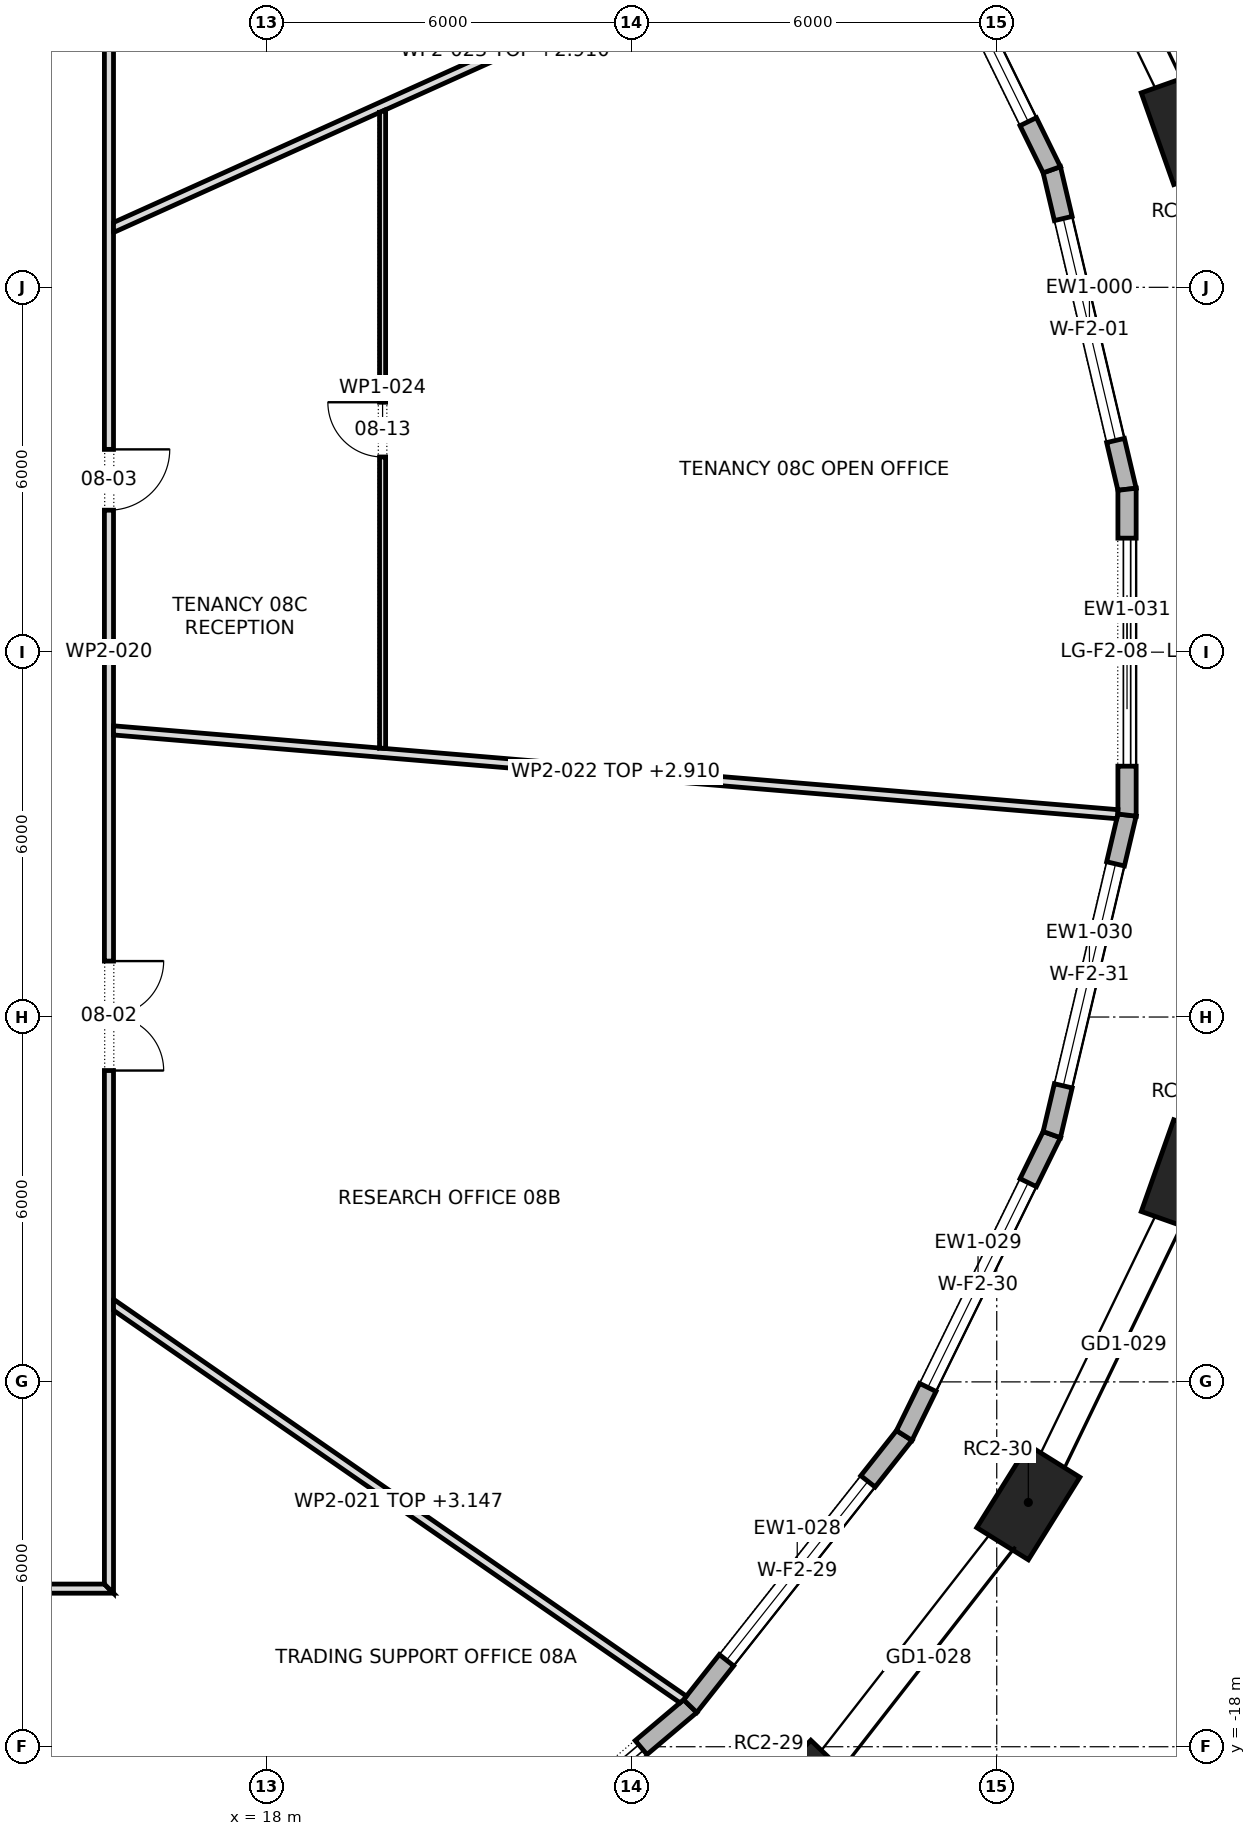
"""IFC4 building model, lengths in metres.
Left out: names, types, materials, properties, quantities, classifications, styles, units other than length and angle.
Written with IfcOpenShell. Run it as: python <this file> out.ifc"""

import sys

from ifc_helpers import new_model, si_unit, direction, frame, frame_2d, origin, origin_2d, place, context, subcontext, project, spatial, polyline, rectangle, outline, extrude, element, fill, save


model = new_model("IFC4")
c1 = context("Model", 3, precision=1e-05, world=origin(), true_north=direction((0.0, 1.0)))
c2 = subcontext(c1, "Body", "Model", "MODEL_VIEW")
j1 = project(units=[si_unit("LENGTHUNIT", "METRE"), si_unit("PLANEANGLEUNIT", "RADIAN")], contexts=[c1])
p1 = place(None, origin())
s1 = spatial("IfcSite", under=j1, at=p1, CompositionType="ELEMENT")
p2 = place(p1, origin())
s2 = spatial("IfcBuilding", under=s1, at=p2, CompositionType="ELEMENT")
p3 = place(p2, frame((0.0, 0.0, 125.5)))
s3 = spatial("IfcBuildingStorey", under=s2, at=p3, CompositionType="ELEMENT", Elevation=125.5)
for number, where, z_axis, x_axis in (
    (1, (33.115, 8.61, 0.0), (0.0, 0.0, 1.0), (-0.334, 0.943, 0.0)),
    (2, (26.75, -18.817, 0.0), (0.0, 0.0, 1.0), (0.692, 0.722, 0.0)),
    (3, (30.519, -13.982, 0.0), (0.0, 0.0, 1.0), (0.529, 0.849, 0.0)),
    (4, (33.115, -8.61, 0.0), (0.0, 0.0, 1.0), (0.334, 0.943, 0.0)),
):
    element("IfcColumn", number, at=place(p3, frame(where, z_axis=z_axis, x_axis=x_axis)), inside=s3, PredefinedType="COLUMN", context=c2, shape_type="SweptSolid", body=[
        extrude(rectangle(XDim=1.6, YDim=1.0, at=origin_2d()), origin(), (0.0, 0.0, 1.0), 4.2),
    ])
p4 = place(p3, frame((32.143, 2.679, 0.0), z_axis=(0.0, 0.0, 1.0), x_axis=(-0.229200658045, 0.973379195561, 0.0)))
e5 = element("IfcWall", 5, at=p4, inside=s3, PredefinedType="STANDARD", context=c2, shape_type="SweptSolid", body=[
    extrude(outline(polyline([(-0.017, -0.15), (5.415, -0.15), (5.382, 0.15), (0.017, 0.15), (-0.017, -0.15)])), origin(), (0.0, 0.0, 1.0), 3.9),
])
p5 = place(p4, frame((0.824, 0.0, 0.6)))
e6 = element("IfcOpeningElement", 6, at=p5, cuts=e5, PredefinedType="OPENING", context=c2, shape_type="SweptSolid", body=[
    extrude(rectangle(XDim=3.75, YDim=2.85, at=frame_2d((1.875, 1.425))), frame((0.0, 0.162, 0.0), z_axis=(0.0, -1.0, 0.0), x_axis=(1.0, 0.0, 0.0)), (0.0, 0.0, 1.0), 0.324),
])
p6 = place(p3, frame((30.905, 7.934, 0.0), z_axis=(0.0, 0.0, 1.0), x_axis=(-0.440306401535, 0.897847577692, 0.0)))
e7 = element("IfcWall", 7, at=p6, inside=s3, PredefinedType="STANDARD", context=c2, shape_type="SweptSolid", body=[
    extrude(outline(polyline([(-0.017, -0.15), (5.527, -0.15), (5.494, 0.15), (0.017, 0.15), (-0.017, -0.15)])), origin(), (0.0, 0.0, 1.0), 3.9),
])
p7 = place(p6, frame((0.88, 0.0, 0.6)))
e8 = element("IfcOpeningElement", 8, at=p7, cuts=e7, PredefinedType="OPENING", context=c2, shape_type="SweptSolid", body=[
    extrude(rectangle(XDim=3.75, YDim=2.85, at=frame_2d((1.875, 1.425))), frame((0.0, 0.162, 0.0), z_axis=(0.0, -1.0, 0.0), x_axis=(1.0, 0.0, 0.0)), (0.0, 0.0, 1.0), 0.324),
])
p8 = place(p3, frame((20.48, -21.115, 0.0), z_axis=(0.0, 0.0, 1.0), x_axis=(0.763937302001, 0.645290476151, 0.0)))
e9 = element("IfcWall", 9, at=p8, inside=s3, PredefinedType="STANDARD", context=c2, shape_type="SweptSolid", body=[
    extrude(outline(polyline([(-0.014, -0.15), (5.877, -0.15), (5.847, 0.15), (0.014, 0.15), (-0.014, -0.15)])), origin(), (0.0, 0.0, 1.0), 3.9),
])
p9 = place(p8, frame((1.056, 0.0, 0.0)))
e10 = element("IfcOpeningElement", 10, at=p9, cuts=e9, PredefinedType="OPENING", context=c2, shape_type="SweptSolid", body=[
    extrude(rectangle(XDim=3.75, YDim=3.45, at=frame_2d((1.875, 1.725))), frame((0.0, 0.162, 0.0), z_axis=(0.0, -1.0, 0.0), x_axis=(1.0, 0.0, 0.0)), (0.0, 0.0, 1.0), 0.324),
])
p10 = place(p3, frame((24.958, -17.332, 0.0), z_axis=(0.0, 0.0, 1.0), x_axis=(0.62038332391, 0.784298751379, 0.0)))
e11 = element("IfcWall", 11, at=p10, inside=s3, PredefinedType="STANDARD", context=c2, shape_type="SweptSolid", body=[
    extrude(outline(polyline([(-0.015, -0.15), (5.691, -0.15), (5.659, 0.15), (0.015, 0.15), (-0.015, -0.15)])), origin(), (0.0, 0.0, 1.0), 3.9),
])
p11 = place(p10, frame((0.962, 0.0, 0.6)))
e12 = element("IfcOpeningElement", 12, at=p11, cuts=e11, PredefinedType="OPENING", context=c2, shape_type="SweptSolid", body=[
    extrude(rectangle(XDim=3.75, YDim=2.85, at=frame_2d((1.875, 1.425))), frame((0.0, 0.162, 0.0), z_axis=(0.0, -1.0, 0.0), x_axis=(1.0, 0.0, 0.0)), (0.0, 0.0, 1.0), 0.324),
])
p12 = place(p3, frame((28.479, -12.881, 0.0), z_axis=(0.0, 0.0, 1.0), x_axis=(0.440306401535, 0.897847577692, 0.0)))
e13 = element("IfcWall", 13, at=p12, inside=s3, PredefinedType="STANDARD", context=c2, shape_type="SweptSolid", body=[
    extrude(outline(polyline([(-0.016, -0.15), (5.527, -0.15), (5.494, 0.15), (0.016, 0.15), (-0.016, -0.15)])), origin(), (0.0, 0.0, 1.0), 3.9),
])
p13 = place(p12, frame((0.88, 0.0, 0.6)))
e14 = element("IfcOpeningElement", 14, at=p13, cuts=e13, PredefinedType="OPENING", context=c2, shape_type="SweptSolid", body=[
    extrude(rectangle(XDim=3.75, YDim=2.85, at=frame_2d((1.875, 1.425))), frame((0.0, 0.162, 0.0), z_axis=(0.0, -1.0, 0.0), x_axis=(1.0, 0.0, 0.0)), (0.0, 0.0, 1.0), 0.324),
])
p14 = place(p3, frame((30.905, -7.934, 0.0), z_axis=(0.0, 0.0, 1.0), x_axis=(0.229200658045, 0.973379195561, 0.0)))
e15 = element("IfcWall", 15, at=p14, inside=s3, PredefinedType="STANDARD", context=c2, shape_type="SweptSolid", body=[
    extrude(outline(polyline([(-0.017, -0.15), (5.416, -0.15), (5.381, 0.15), (0.017, 0.15), (-0.017, -0.15)])), origin(), (0.0, 0.0, 1.0), 3.9),
])
p15 = place(p14, frame((0.824, 0.0, 0.6)))
e16 = element("IfcOpeningElement", 16, at=p15, cuts=e15, PredefinedType="OPENING", context=c2, shape_type="SweptSolid", body=[
    extrude(rectangle(XDim=3.75, YDim=2.85, at=frame_2d((1.875, 1.425))), frame((0.0, 0.162, 0.0), z_axis=(0.0, -1.0, 0.0), x_axis=(1.0, 0.0, 0.0)), (0.0, 0.0, 1.0), 0.324),
])
p16 = place(p3, frame((32.143, -2.679, 0.0), z_axis=(0.0, 0.0, 1.0), x_axis=(0.0, 1.0, 0.0)))
e17 = element("IfcWall", 17, at=p16, inside=s3, PredefinedType="STANDARD", context=c2, shape_type="SweptSolid", body=[
    extrude(outline(polyline([(-0.017, -0.15), (5.375, -0.15), (5.341, 0.15), (0.017, 0.15), (-0.017, -0.15)])), origin(), (0.0, 0.0, 1.0), 3.9),
])
p17 = place(p16, frame((0.804, 0.0, 0.0)))
e18 = element("IfcOpeningElement", 18, at=p17, cuts=e17, PredefinedType="OPENING", context=c2, shape_type="SweptSolid", body=[
    extrude(rectangle(XDim=3.75, YDim=3.45, at=frame_2d((1.875, 1.725))), frame((0.0, 0.162, 0.0), z_axis=(0.0, -1.0, 0.0), x_axis=(1.0, 0.0, 0.0)), (0.0, 0.0, 1.0), 0.324),
])
p18 = place(p3, frame((-15.475, -15.4, 0.0), z_axis=(0.0, 0.0, 1.0), x_axis=(1.0, 0.0, 0.0)))
e19 = element("IfcWall", 19, at=p18, inside=s3, PredefinedType="PARTITIONING", context=c2, shape_type="SweptSolid", body=[
    extrude(outline(polyline([(0.0, -0.075), (1.935, -0.075), (3.869, -0.075), (5.803, -0.075), (7.738, -0.075), (9.672, -0.075), (11.606, -0.075), (13.541, -0.075), (15.475, -0.075), (17.409, -0.075), (19.344, -0.075), (21.278, -0.075), (23.212, -0.075), (25.147, -0.075), (27.081, -0.075), (29.016, -0.075), (30.95, -0.075), (30.8, 0.075), (28.885, 0.075), (26.969, 0.075), (25.053, 0.075), (23.138, 0.075), (21.222, 0.075), (19.306, 0.075), (17.391, 0.075), (15.475, 0.075), (13.56, 0.075), (11.644, 0.075), (9.728, 0.075), (7.812, 0.075), (5.897, 0.075), (3.981, 0.075), (2.066, 0.075), (0.15, 0.075), (0.0, -0.075)])), origin(), (0.0, 0.0, 1.0), 3.9),
])
p19 = place(p18, frame((27.545, 0.0, 0.0)))
e20 = element("IfcOpeningElement", 20, at=p19, cuts=e19, PredefinedType="OPENING", context=c2, shape_type="SweptSolid", body=[
    extrude(rectangle(XDim=1.0, YDim=2.1, at=frame_2d((0.5, 1.05))), frame((0.0, 0.087, 0.0), z_axis=(0.0, -1.0, 0.0), x_axis=(1.0, 0.0, 0.0)), (0.0, 0.0, 1.0), 0.174),
])
p20 = place(p18, frame((5.975, 0.0, 0.0)))
e21 = element("IfcOpeningElement", 21, at=p20, cuts=e19, PredefinedType="OPENING", context=c2, shape_type="SweptSolid", body=[
    extrude(rectangle(XDim=1.8, YDim=2.1, at=frame_2d((0.9, 1.05))), frame((0.0, 0.087, 0.0), z_axis=(0.0, -1.0, 0.0), x_axis=(1.0, 0.0, 0.0)), (0.0, 0.0, 1.0), 0.174),
])
p21 = place(p18, frame((20.78, 0.0, 0.0)))
e22 = element("IfcOpeningElement", 22, at=p21, cuts=e19, PredefinedType="OPENING", context=c2, shape_type="SweptSolid", body=[
    extrude(rectangle(XDim=1.0, YDim=2.1, at=frame_2d((0.5, 1.05))), frame((0.0, 0.087, 0.0), z_axis=(0.0, -1.0, 0.0), x_axis=(1.0, 0.0, 0.0)), (0.0, 0.0, 1.0), 0.174),
])
p22 = place(p18, frame((15.01, 0.0, 0.0)))
e23 = element("IfcOpeningElement", 23, at=p22, cuts=e19, PredefinedType="OPENING", context=c2, shape_type="SweptSolid", body=[
    extrude(rectangle(XDim=1.0, YDim=2.1, at=frame_2d((0.5, 1.05))), frame((0.0, 0.087, 0.0), z_axis=(0.0, -1.0, 0.0), x_axis=(1.0, 0.0, 0.0)), (0.0, 0.0, 1.0), 0.174),
])
p23 = place(p3, frame((9.762, -15.435, 0.0), z_axis=(0.0, 0.0, 1.0), x_axis=(0.534830284385, -0.844959506074, 0.0)))
e24 = element("IfcWall", 24, at=p23, inside=s3, PredefinedType="PARTITIONING", context=c2, shape_type="SweptSolid", body=[
    extrude(outline(polyline([(0.0, -0.075), (1.726, -0.075), (3.452, -0.075), (5.177, -0.075), (5.211, -0.022), (5.295, -0.075), (6.883, -0.075), (8.47, -0.075), (10.057, -0.075), (10.057, 0.075), (8.064, 0.075), (6.072, 0.075), (4.08, 0.075), (2.087, 0.075), (0.095, 0.075), (0.0, -0.075), (0.0, -0.075)])), origin(), (0.0, 0.0, 1.0), 3.147),
])
p24 = place(p3, frame((15.4, -15.475, 0.0), z_axis=(0.0, 0.0, 1.0), x_axis=(0.0, 1.0, 0.0)))
e25 = element("IfcWall", 25, at=p24, inside=s3, PredefinedType="PARTITIONING", context=c2, shape_type="SweptSolid", body=[
    extrude(outline(polyline([(0.0, -0.075), (1.935, -0.075), (3.869, -0.075), (5.803, -0.075), (7.738, -0.075), (9.672, -0.075), (11.606, -0.075), (13.541, -0.075), (15.475, -0.075), (17.409, -0.075), (19.344, -0.075), (21.278, -0.075), (23.212, -0.075), (25.147, -0.075), (27.081, -0.075), (29.016, -0.075), (30.95, -0.075), (30.8, 0.075), (28.885, 0.075), (26.969, 0.075), (25.053, 0.075), (23.138, 0.075), (21.222, 0.075), (19.306, 0.075), (17.391, 0.075), (15.475, 0.075), (13.56, 0.075), (11.644, 0.075), (9.728, 0.075), (7.812, 0.075), (5.897, 0.075), (3.981, 0.075), (2.066, 0.075), (0.15, 0.075), (0.0, -0.075)])), origin(), (0.0, 0.0, 1.0), 3.9),
])
p25 = place(p24, frame((8.595, 0.0, 0.0)))
e26 = element("IfcOpeningElement", 26, at=p25, cuts=e25, PredefinedType="OPENING", context=c2, shape_type="SweptSolid", body=[
    extrude(rectangle(XDim=1.8, YDim=2.1, at=frame_2d((0.9, 1.05))), frame((0.0, 0.087, 0.0), z_axis=(0.0, -1.0, 0.0), x_axis=(1.0, 0.0, 0.0)), (0.0, 0.0, 1.0), 0.174),
])
p26 = place(p24, frame((17.81, 0.0, 0.0)))
e27 = element("IfcOpeningElement", 27, at=p26, cuts=e25, PredefinedType="OPENING", context=c2, shape_type="SweptSolid", body=[
    extrude(rectangle(XDim=1.0, YDim=2.1, at=frame_2d((0.5, 1.05))), frame((0.0, 0.087, 0.0), z_axis=(0.0, -1.0, 0.0), x_axis=(1.0, 0.0, 0.0)), (0.0, 0.0, 1.0), 0.174),
])
p27 = place(p24, frame((25.75, 0.0, 0.0)))
e28 = element("IfcOpeningElement", 28, at=p27, cuts=e25, PredefinedType="OPENING", context=c2, shape_type="SweptSolid", body=[
    extrude(rectangle(XDim=1.8, YDim=2.1, at=frame_2d((0.9, 1.05))), frame((0.0, 0.087, 0.0), z_axis=(0.0, -1.0, 0.0), x_axis=(1.0, 0.0, 0.0)), (0.0, 0.0, 1.0), 0.174),
])
p28 = place(p3, frame((15.433, -10.702, 0.0), z_axis=(0.0, 0.0, 1.0), x_axis=(0.82200427234, -0.56948132213, 0.0)))
e29 = element("IfcWall", 29, at=p28, inside=s3, PredefinedType="PARTITIONING", context=c2, shape_type="SweptSolid", body=[
    extrude(outline(polyline([(0.104, -0.075), (1.992, -0.075), (3.881, -0.075), (5.77, -0.075), (7.659, -0.075), (9.548, -0.075), (11.437, -0.075), (11.457, 0.0), (11.461, 0.071), (11.461, 0.075), (9.551, 0.075), (7.641, 0.075), (5.731, 0.075), (3.821, 0.075), (1.91, 0.075), (0.0, 0.075), (0.0, 0.074), (0.104, -0.075)])), origin(), (0.0, 0.0, 1.0), 3.147),
])
p29 = place(p3, frame((15.469, -1.286, 0.0), z_axis=(0.0, 0.0, 1.0), x_axis=(0.996533353756, -0.083194199634, 0.0)))
e30 = element("IfcWall", 30, at=p29, inside=s3, PredefinedType="PARTITIONING", context=c2, shape_type="SweptSolid", body=[
    extrude(outline(polyline([(0.012, -0.075), (1.852, -0.075), (3.691, -0.075), (5.531, -0.075), (7.371, -0.075), (9.21, -0.075), (11.05, -0.075), (12.89, -0.075), (14.729, -0.075), (16.569, -0.075), (16.574, -0.037), (16.574, 0.075), (14.836, 0.075), (13.097, 0.075), (11.358, 0.075), (9.619, 0.075), (7.881, 0.075), (6.142, 0.075), (4.403, 0.075), (4.39, 0.074), (4.39, 0.075), (2.927, 0.075), (1.463, 0.075), (0.0, 0.075), (0.0, 0.069), (0.012, -0.075)])), origin(), (0.0, 0.0, 1.0), 2.91),
])
p30 = place(p3, frame((15.444, 6.97, 0.0), z_axis=(0.0, 0.0, 1.0), x_axis=(0.911543819319, 0.411202949237, 0.0)))
e31 = element("IfcWall", 31, at=p30, inside=s3, PredefinedType="PARTITIONING", context=c2, shape_type="SweptSolid", body=[
    extrude(outline(polyline([(0.0, -0.075), (1.6, -0.075), (3.2, -0.075), (4.8, -0.075), (4.801, -0.073), (4.805, -0.075), (6.677, -0.075), (8.549, -0.075), (10.421, -0.075), (12.293, -0.075), (14.166, -0.075), (14.166, -0.063), (14.163, 0.007), (14.146, 0.075), (12.386, 0.075), (10.627, 0.075), (8.867, 0.075), (7.107, 0.075), (5.347, 0.075), (3.587, 0.075), (1.828, 0.075), (0.068, 0.075), (0.0, -0.075)])), origin(), (0.0, 0.0, 1.0), 2.91),
])
p31 = place(p3, frame((19.9, 8.92, 0.0), z_axis=(0.0, 0.0, 1.0), x_axis=(0.0, -1.0, 0.0)))
e32 = element("IfcWall", 32, at=p31, inside=s3, PredefinedType="PARTITIONING", context=c2, shape_type="SweptSolid", body=[
    extrude(outline(polyline([(0.045, -0.05), (1.787, -0.05), (3.529, -0.05), (5.271, -0.05), (7.012, -0.05), (8.754, -0.05), (10.496, -0.05), (10.504, 0.048), (10.504, 0.05), (8.754, 0.05), (7.003, 0.05), (5.252, 0.05), (3.501, 0.05), (1.751, 0.05), (0.0, 0.05), (0.0, 0.049), (0.045, -0.05)])), origin(), (0.0, 0.0, 1.0), 3.9),
])
p32 = place(p31, frame((4.81, 0.0, 0.0)))
e33 = element("IfcOpeningElement", 33, at=p32, cuts=e32, PredefinedType="OPENING", context=c2, shape_type="SweptSolid", body=[
    extrude(rectangle(XDim=0.9, YDim=2.1, at=frame_2d((0.45, 1.05))), frame((0.0, 0.062, 0.0), z_axis=(0.0, -1.0, 0.0), x_axis=(1.0, 0.0, 0.0)), (0.0, 0.0, 1.0), 0.124),
])
p33 = place(p5, origin())
e34 = element("IfcWindow", 34, at=p33, inside=s3, PartitioningType="TRIPLE_PANEL_VERTICAL", PredefinedType="WINDOW", context=c2, shape_type="SweptSolid", body=[
    extrude(rectangle(XDim=3.75, YDim=2.85, at=frame_2d((1.875, 1.425))), frame((0.0, 0.03, 0.0), z_axis=(0.0, -1.0, 0.0), x_axis=(1.0, 0.0, 0.0)), (0.0, 0.0, 1.0), 0.06),
])
fill(e6, e34)
p34 = place(p7, origin())
e35 = element("IfcWindow", 35, at=p34, inside=s3, PartitioningType="TRIPLE_PANEL_VERTICAL", PredefinedType="WINDOW", context=c2, shape_type="SweptSolid", body=[
    extrude(rectangle(XDim=3.75, YDim=2.85, at=frame_2d((1.875, 1.425))), frame((0.0, 0.03, 0.0), z_axis=(0.0, -1.0, 0.0), x_axis=(1.0, 0.0, 0.0)), (0.0, 0.0, 1.0), 0.06),
])
fill(e8, e35)
p35 = place(p9, origin())
e36 = element("IfcDoor", 36, at=p35, inside=s3, OperationType="DOUBLE_DOOR_SLIDING", PredefinedType="DOOR", context=c2, shape_type="SweptSolid", body=[
    extrude(rectangle(XDim=3.75, YDim=3.45, at=frame_2d((1.875, 1.725))), frame((0.0, 0.025, 0.0), z_axis=(0.0, -1.0, 0.0), x_axis=(1.0, 0.0, 0.0)), (0.0, 0.0, 1.0), 0.05),
])
fill(e10, e36)
p36 = place(p11, origin())
e37 = element("IfcWindow", 37, at=p36, inside=s3, PartitioningType="TRIPLE_PANEL_VERTICAL", PredefinedType="WINDOW", context=c2, shape_type="SweptSolid", body=[
    extrude(rectangle(XDim=3.75, YDim=2.85, at=frame_2d((1.875, 1.425))), frame((0.0, 0.03, 0.0), z_axis=(0.0, -1.0, 0.0), x_axis=(1.0, 0.0, 0.0)), (0.0, 0.0, 1.0), 0.06),
])
fill(e12, e37)
p37 = place(p13, origin())
e38 = element("IfcWindow", 38, at=p37, inside=s3, PartitioningType="TRIPLE_PANEL_VERTICAL", PredefinedType="WINDOW", context=c2, shape_type="SweptSolid", body=[
    extrude(rectangle(XDim=3.75, YDim=2.85, at=frame_2d((1.875, 1.425))), frame((0.0, 0.03, 0.0), z_axis=(0.0, -1.0, 0.0), x_axis=(1.0, 0.0, 0.0)), (0.0, 0.0, 1.0), 0.06),
])
fill(e14, e38)
p38 = place(p15, origin())
e39 = element("IfcWindow", 39, at=p38, inside=s3, PartitioningType="TRIPLE_PANEL_VERTICAL", PredefinedType="WINDOW", context=c2, shape_type="SweptSolid", body=[
    extrude(rectangle(XDim=3.75, YDim=2.85, at=frame_2d((1.875, 1.425))), frame((0.0, 0.03, 0.0), z_axis=(0.0, -1.0, 0.0), x_axis=(1.0, 0.0, 0.0)), (0.0, 0.0, 1.0), 0.06),
])
fill(e16, e39)
p39 = place(p17, origin())
e40 = element("IfcDoor", 40, at=p39, inside=s3, OperationType="DOUBLE_DOOR_SLIDING", PredefinedType="DOOR", context=c2, shape_type="SweptSolid", body=[
    extrude(rectangle(XDim=3.75, YDim=3.45, at=frame_2d((1.875, 1.725))), frame((0.0, 0.025, 0.0), z_axis=(0.0, -1.0, 0.0), x_axis=(1.0, 0.0, 0.0)), (0.0, 0.0, 1.0), 0.05),
])
fill(e18, e40)
p40 = place(p25, frame((1.8, 0.0, 0.0), z_axis=(0.0, 0.0, 1.0), x_axis=(-1.0, 0.0, 0.0)))
e41 = element("IfcDoor", 41, at=p40, inside=s3, OperationType="DOUBLE_DOOR_SINGLE_SWING", PredefinedType="DOOR", context=c2, shape_type="SweptSolid", body=[
    extrude(rectangle(XDim=1.8, YDim=2.1, at=frame_2d((0.9, 1.05))), frame((0.0, 0.025, 0.0), z_axis=(0.0, -1.0, 0.0), x_axis=(1.0, 0.0, 0.0)), (0.0, 0.0, 1.0), 0.05),
])
fill(e26, e41)
p41 = place(p26, frame((1.0, 0.0, 0.0), z_axis=(0.0, 0.0, 1.0), x_axis=(-1.0, 0.0, 0.0)))
e42 = element("IfcDoor", 42, at=p41, inside=s3, OperationType="SINGLE_SWING_RIGHT", PredefinedType="DOOR", context=c2, shape_type="SweptSolid", body=[
    extrude(rectangle(XDim=1.0, YDim=2.1, at=frame_2d((0.5, 1.05))), frame((0.0, 0.025, 0.0), z_axis=(0.0, -1.0, 0.0), x_axis=(1.0, 0.0, 0.0)), (0.0, 0.0, 1.0), 0.05),
])
fill(e27, e42)
p42 = place(p32, frame((0.9, 0.0, 0.0), z_axis=(0.0, 0.0, 1.0), x_axis=(-1.0, 0.0, 0.0)))
e43 = element("IfcDoor", 43, at=p42, inside=s3, OperationType="SINGLE_SWING_LEFT", PredefinedType="DOOR", context=c2, shape_type="SweptSolid", body=[
    extrude(rectangle(XDim=0.9, YDim=2.1, at=frame_2d((0.45, 1.05))), frame((0.0, 0.025, 0.0), z_axis=(0.0, -1.0, 0.0), x_axis=(1.0, 0.0, 0.0)), (0.0, 0.0, 1.0), 0.05),
])
fill(e33, e43)
save(model, sys.argv[1])
